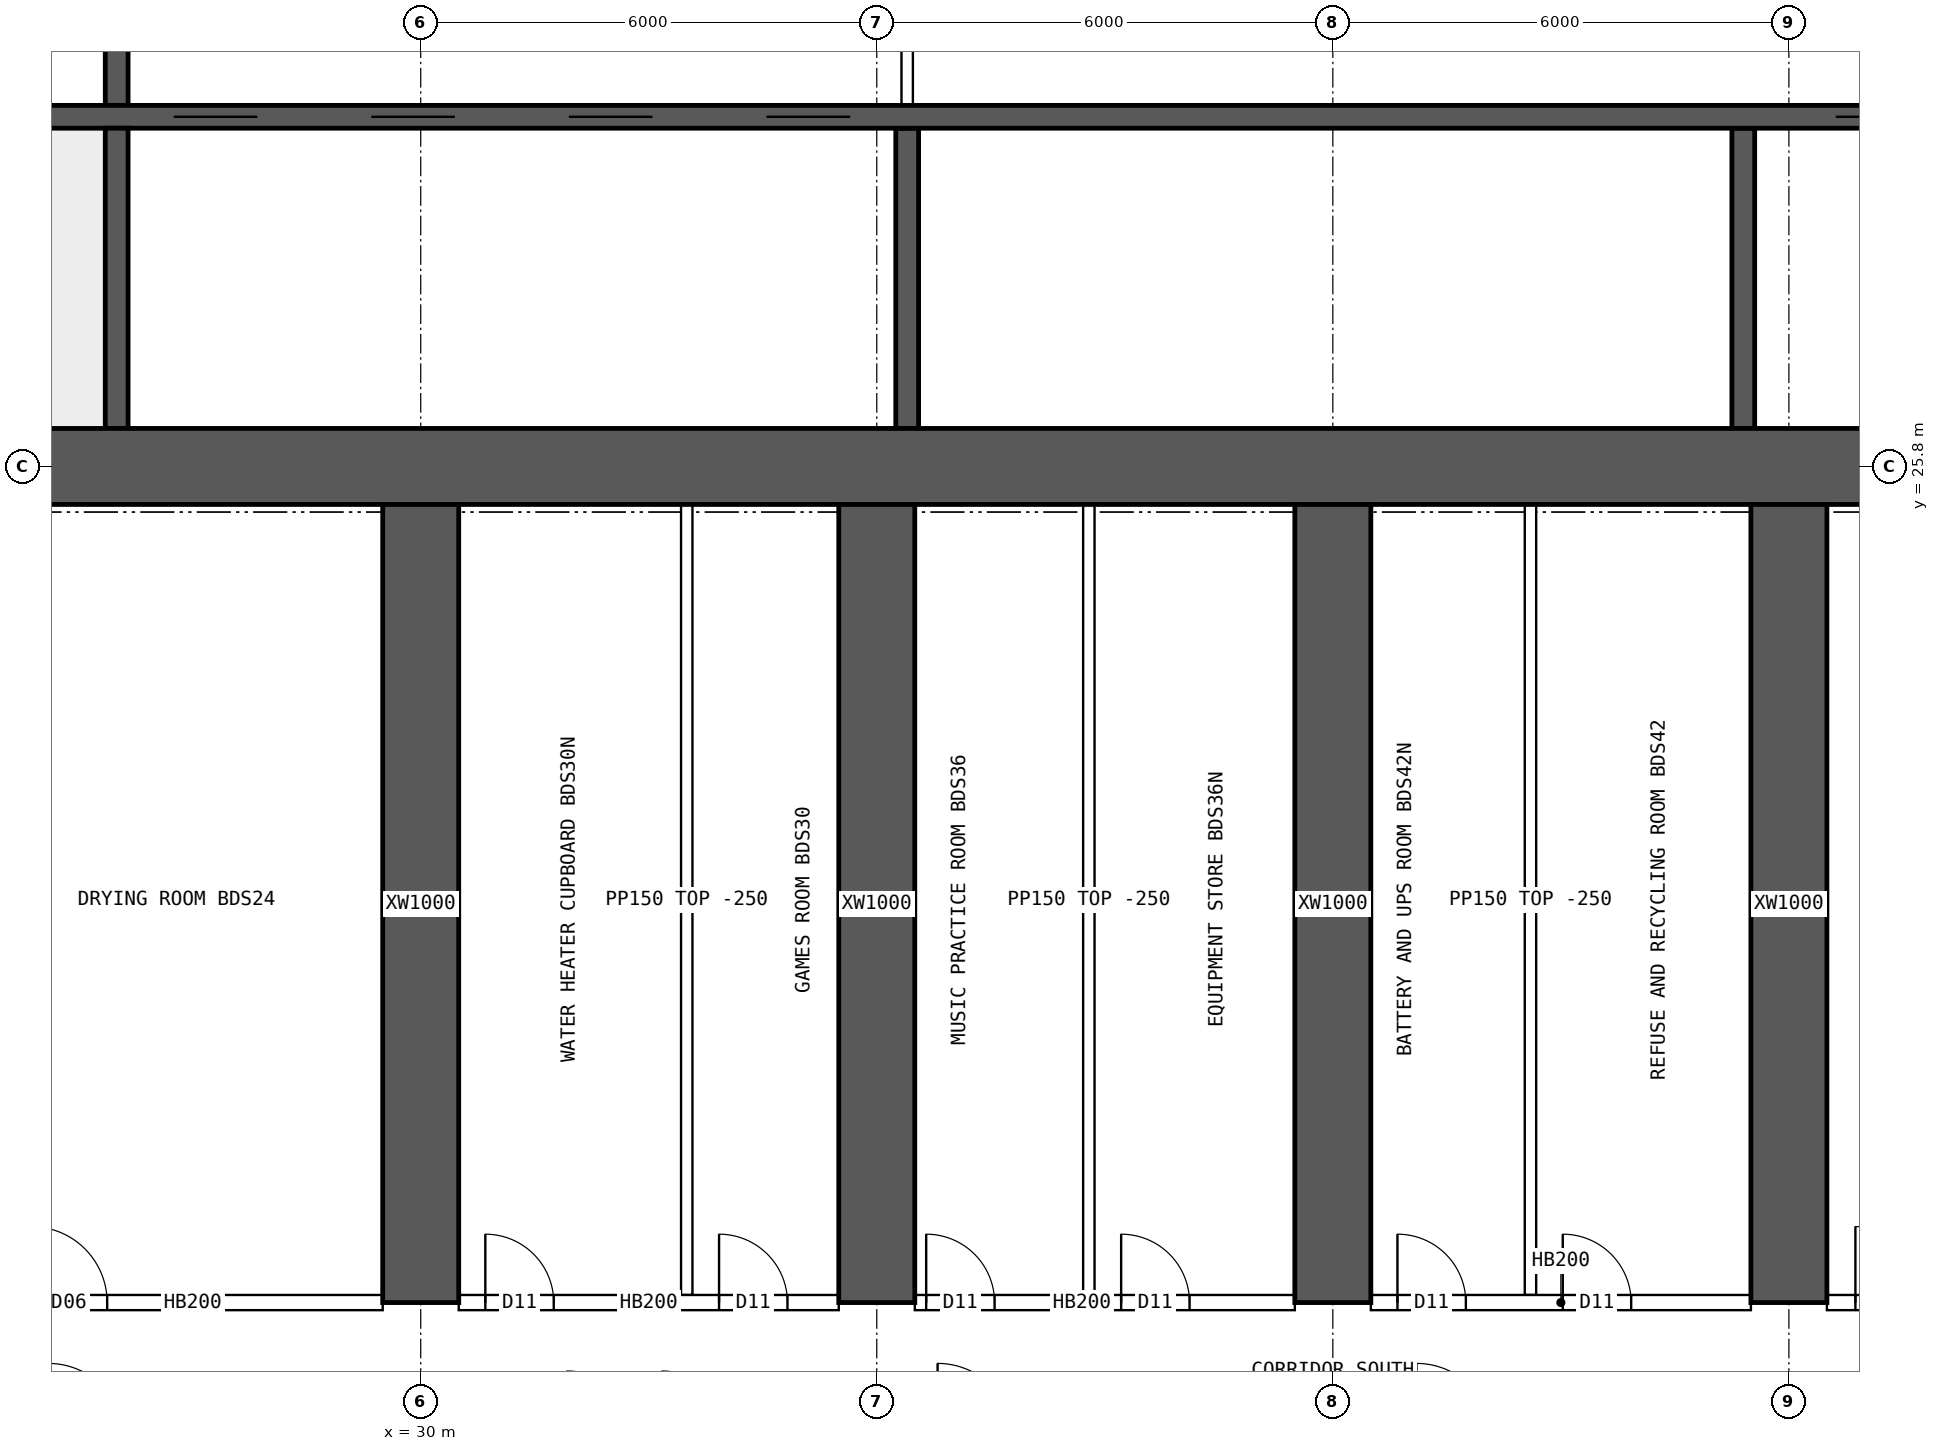
"""IFC4 building model, lengths in metres.
Left out: names, types, materials, properties, quantities, classifications, styles, units other than length and angle.
Written with IfcOpenShell. Run it as: python <this file> out.ifc"""

import sys

from ifc_helpers import new_model, si_unit, direction, frame, frame_2d, origin, place, context, subcontext, project, spatial, rectangle, extrude, element, fill, save


model = new_model("IFC4")
c1 = context("Model", 3, precision=1e-05, world=origin(), true_north=direction((0.0, 1.0)))
c2 = subcontext(c1, "Body", "Model", "MODEL_VIEW")
j1 = project(units=[si_unit("LENGTHUNIT", "METRE"), si_unit("PLANEANGLEUNIT", "RADIAN")], contexts=[c1])
p1 = place(None, origin())
s1 = spatial("IfcSite", under=j1, at=p1, CompositionType="ELEMENT")
p2 = place(p1, origin())
s2 = spatial("IfcBuilding", under=s1, at=p2, CompositionType="ELEMENT")
p3 = place(p2, frame((0.0, 0.0, 23.95)))
s3 = spatial("IfcBuildingStorey", under=s2, at=p3, CompositionType="ELEMENT", Elevation=23.95)
p4 = place(p3, frame((18.0, 25.8, 0.0), z_axis=(0.0, 0.0, 1.0), x_axis=(1.0, 0.0, 0.0)))
e1 = element("IfcWall", 1, at=p4, inside=s3, PredefinedType="SHEAR", context=c2, shape_type="SweptSolid", body=[
    extrude(rectangle(XDim=48.0, YDim=1.0, at=frame_2d((24.0, 0.0))), origin(), (0.0, 0.0, 1.0), 3.75),
])
p5 = place(p3, frame((18.5, 30.4, 0.0), z_axis=(0.0, 0.0, 1.0), x_axis=(1.0, 0.0, 0.0)))
e2 = element("IfcWall", 2, at=p5, inside=s3, PredefinedType="SHEAR", context=c2, shape_type="SweptSolid", body=[
    extrude(rectangle(XDim=47.0, YDim=0.3, at=frame_2d((23.5, 0.0))), origin(), (0.0, 0.0, 1.0), 3.75),
])
p6 = place(p5, frame((0.4, 0.0, 0.0)))
e3 = element("IfcOpeningElement", 3, at=p6, cuts=e2, PredefinedType="OPENING", context=c2, shape_type="SweptSolid", body=[
    extrude(rectangle(XDim=1.0, YDim=2.1, at=frame_2d((0.5, 1.05))), frame((0.0, 0.16, 0.0), z_axis=(0.0, -1.0, 0.0), x_axis=(1.0, 0.0, 0.0)), (0.0, 0.0, 1.0), 0.32),
])
p7 = place(p5, frame((45.6, 0.0, 0.0)))
e4 = element("IfcOpeningElement", 4, at=p7, cuts=e2, PredefinedType="OPENING", context=c2, shape_type="SweptSolid", body=[
    extrude(rectangle(XDim=1.0, YDim=2.1, at=frame_2d((0.5, 1.05))), frame((0.0, 0.16, 0.0), z_axis=(0.0, -1.0, 0.0), x_axis=(1.0, 0.0, 0.0)), (0.0, 0.0, 1.0), 0.32),
])
p8 = place(p5, frame((8.25, 0.0, 0.0)))
e5 = element("IfcOpeningElement", 5, at=p8, cuts=e2, PredefinedType="OPENING", context=c2, shape_type="SweptSolid", body=[
    extrude(rectangle(XDim=1.1, YDim=2.1, at=frame_2d((0.55, 1.05))), frame((0.0, 0.16, 0.0), z_axis=(0.0, -1.0, 0.0), x_axis=(1.0, 0.0, 0.0)), (0.0, 0.0, 1.0), 0.32),
])
p9 = place(p5, frame((10.85, 0.0, 0.0)))
e6 = element("IfcOpeningElement", 6, at=p9, cuts=e2, PredefinedType="OPENING", context=c2, shape_type="SweptSolid", body=[
    extrude(rectangle(XDim=1.1, YDim=2.1, at=frame_2d((0.55, 1.05))), frame((0.0, 0.16, 0.0), z_axis=(0.0, -1.0, 0.0), x_axis=(1.0, 0.0, 0.0)), (0.0, 0.0, 1.0), 0.32),
])
p10 = place(p5, frame((13.45, 0.0, 0.0)))
e7 = element("IfcOpeningElement", 7, at=p10, cuts=e2, PredefinedType="OPENING", context=c2, shape_type="SweptSolid", body=[
    extrude(rectangle(XDim=1.1, YDim=2.1, at=frame_2d((0.55, 1.05))), frame((0.0, 0.16, 0.0), z_axis=(0.0, -1.0, 0.0), x_axis=(1.0, 0.0, 0.0)), (0.0, 0.0, 1.0), 0.32),
])
p11 = place(p5, frame((16.05, 0.0, 0.0)))
e8 = element("IfcOpeningElement", 8, at=p11, cuts=e2, PredefinedType="OPENING", context=c2, shape_type="SweptSolid", body=[
    extrude(rectangle(XDim=1.1, YDim=2.1, at=frame_2d((0.55, 1.05))), frame((0.0, 0.16, 0.0), z_axis=(0.0, -1.0, 0.0), x_axis=(1.0, 0.0, 0.0)), (0.0, 0.0, 1.0), 0.32),
])
p12 = place(p5, frame((30.117, 0.0, 0.0)))
e9 = element("IfcOpeningElement", 9, at=p12, cuts=e2, PredefinedType="OPENING", context=c2, shape_type="SweptSolid", body=[
    extrude(rectangle(XDim=1.1, YDim=2.1, at=frame_2d((0.55, 1.05))), frame((0.0, 0.16, 0.0), z_axis=(0.0, -1.0, 0.0), x_axis=(1.0, 0.0, 0.0)), (0.0, 0.0, 1.0), 0.32),
])
p13 = place(p5, frame((33.65, 0.0, 0.0)))
e10 = element("IfcOpeningElement", 10, at=p13, cuts=e2, PredefinedType="OPENING", context=c2, shape_type="SweptSolid", body=[
    extrude(rectangle(XDim=1.1, YDim=2.1, at=frame_2d((0.55, 1.05))), frame((0.0, 0.16, 0.0), z_axis=(0.0, -1.0, 0.0), x_axis=(1.0, 0.0, 0.0)), (0.0, 0.0, 1.0), 0.32),
])
p14 = place(p5, frame((37.183, 0.0, 0.0)))
e11 = element("IfcOpeningElement", 11, at=p14, cuts=e2, PredefinedType="OPENING", context=c2, shape_type="SweptSolid", body=[
    extrude(rectangle(XDim=1.1, YDim=2.1, at=frame_2d((0.55, 1.05))), frame((0.0, 0.16, 0.0), z_axis=(0.0, -1.0, 0.0), x_axis=(1.0, 0.0, 0.0)), (0.0, 0.0, 1.0), 0.32),
])
p15 = place(p3, frame((26.0, 26.3, 0.0), z_axis=(0.0, 0.0, 1.0), x_axis=(0.0, 1.0, 0.0)))
e12 = element("IfcWall", 12, at=p15, inside=s3, PredefinedType="SHEAR", context=c2, shape_type="SweptSolid", body=[
    extrude(rectangle(XDim=3.95, YDim=0.3, at=frame_2d((1.975, 0.0))), origin(), (0.0, 0.0, 1.0), 3.75),
])
p16 = place(p3, frame((26.0, 30.55, 0.0), z_axis=(0.0, 0.0, 1.0), x_axis=(0.0, 1.0, 0.0)))
e13 = element("IfcWall", 13, at=p16, inside=s3, PredefinedType="SHEAR", context=c2, shape_type="SweptSolid", body=[
    extrude(rectangle(XDim=3.9, YDim=0.3, at=frame_2d((1.95, 0.0))), origin(), (0.0, 0.0, 1.0), 3.75),
])
p17 = place(p16, frame((1.4, 0.0, 0.0)))
e14 = element("IfcOpeningElement", 14, at=p17, cuts=e13, PredefinedType="OPENING", context=c2, shape_type="SweptSolid", body=[
    extrude(rectangle(XDim=1.2, YDim=2.1, at=frame_2d((0.6, 1.05))), frame((0.0, 0.16, 0.0), z_axis=(0.0, -1.0, 0.0), x_axis=(1.0, 0.0, 0.0)), (0.0, 0.0, 1.0), 0.32),
])
for number, where, z_axis, x_axis in (
    (15, (36.4, 26.3, 0.0), (0.0, 0.0, 1.0), (0.0, 1.0, 0.0)),
    (16, (47.4, 26.3, 0.0), (0.0, 0.0, 1.0), (0.0, 1.0, 0.0)),
):
    element("IfcWall", number, at=place(p3, frame(where, z_axis=z_axis, x_axis=x_axis)), inside=s3, PredefinedType="SHEAR", context=c2, shape_type="SweptSolid", body=[
        extrude(rectangle(XDim=3.95, YDim=0.3, at=frame_2d((1.975, 0.0))), origin(), (0.0, 0.0, 1.0), 3.75),
    ])
for number, where, z_axis, x_axis in (
    (17, (30.0, 14.8, 0.0), (0.0, 0.0, 1.0), (0.0, 1.0, 0.0)),
    (18, (36.0, 14.8, 0.0), (0.0, 0.0, 1.0), (0.0, 1.0, 0.0)),
    (19, (42.0, 14.8, 0.0), (0.0, 0.0, 1.0), (0.0, 1.0, 0.0)),
    (20, (48.0, 14.8, 0.0), (0.0, 0.0, 1.0), (0.0, 1.0, 0.0)),
):
    element("IfcWall", number, at=place(p3, frame(where, z_axis=z_axis, x_axis=x_axis)), inside=s3, PredefinedType="SHEAR", context=c2, shape_type="SweptSolid", body=[
        extrude(rectangle(XDim=10.5, YDim=1.0, at=frame_2d((5.25, 0.0))), origin(), (0.0, 0.0, 1.0), 3.75),
    ])
p18 = place(p3, frame((36.4, 30.55, 0.0), z_axis=(0.0, 0.0, 1.0), x_axis=(0.0, 1.0, 0.0)))
e21 = element("IfcWall", 21, at=p18, inside=s3, PredefinedType="SOLIDWALL", context=c2, shape_type="SweptSolid", body=[
    extrude(rectangle(XDim=3.9, YDim=0.15, at=frame_2d((1.95, 0.0))), origin(), (0.0, 0.0, 1.0), 3.5),
])
p19 = place(p18, frame((1.15, 0.0, 0.0)))
e22 = element("IfcOpeningElement", 22, at=p19, cuts=e21, PredefinedType="OPENING", context=c2, shape_type="SweptSolid", body=[
    extrude(rectangle(XDim=1.6, YDim=2.1, at=frame_2d((0.8, 1.05))), frame((0.0, 0.085, 0.0), z_axis=(0.0, -1.0, 0.0), x_axis=(1.0, 0.0, 0.0)), (0.0, 0.0, 1.0), 0.17),
])
p20 = place(p3, frame((24.5, 14.8, 0.0), z_axis=(0.0, 0.0, 1.0), x_axis=(1.0, 0.0, 0.0)))
e23 = element("IfcWall", 23, at=p20, inside=s3, PredefinedType="SOLIDWALL", context=c2, shape_type="SweptSolid", body=[
    extrude(rectangle(XDim=5.0, YDim=0.2, at=frame_2d((2.5, 0.0))), origin(), (0.0, 0.0, 1.0), 3.5),
])
p21 = place(p20, frame((0.375, 0.0, 0.0)))
e24 = element("IfcOpeningElement", 24, at=p21, cuts=e23, PredefinedType="OPENING", context=c2, shape_type="SweptSolid", body=[
    extrude(rectangle(XDim=1.0, YDim=2.1, at=frame_2d((0.5, 1.05))), frame((0.0, 0.11, 0.0), z_axis=(0.0, -1.0, 0.0), x_axis=(1.0, 0.0, 0.0)), (0.0, 0.0, 1.0), 0.22),
])
p22 = place(p3, frame((30.5, 14.8, 0.0), z_axis=(0.0, 0.0, 1.0), x_axis=(1.0, 0.0, 0.0)))
e25 = element("IfcWall", 25, at=p22, inside=s3, PredefinedType="SOLIDWALL", context=c2, shape_type="SweptSolid", body=[
    extrude(rectangle(XDim=5.0, YDim=0.2, at=frame_2d((2.5, 0.0))), origin(), (0.0, 0.0, 1.0), 3.5),
])
p23 = place(p22, frame((0.35, 0.0, 0.0)))
e26 = element("IfcOpeningElement", 26, at=p23, cuts=e25, PredefinedType="OPENING", context=c2, shape_type="SweptSolid", body=[
    extrude(rectangle(XDim=0.9, YDim=2.1, at=frame_2d((0.45, 1.05))), frame((0.0, 0.11, 0.0), z_axis=(0.0, -1.0, 0.0), x_axis=(1.0, 0.0, 0.0)), (0.0, 0.0, 1.0), 0.22),
])
p24 = place(p22, frame((3.425, 0.0, 0.0)))
e27 = element("IfcOpeningElement", 27, at=p24, cuts=e25, PredefinedType="OPENING", context=c2, shape_type="SweptSolid", body=[
    extrude(rectangle(XDim=0.9, YDim=2.1, at=frame_2d((0.45, 1.05))), frame((0.0, 0.11, 0.0), z_axis=(0.0, -1.0, 0.0), x_axis=(1.0, 0.0, 0.0)), (0.0, 0.0, 1.0), 0.22),
])
p25 = place(p3, frame((36.5, 14.8, 0.0), z_axis=(0.0, 0.0, 1.0), x_axis=(1.0, 0.0, 0.0)))
e28 = element("IfcWall", 28, at=p25, inside=s3, PredefinedType="SOLIDWALL", context=c2, shape_type="SweptSolid", body=[
    extrude(rectangle(XDim=5.0, YDim=0.2, at=frame_2d((2.5, 0.0))), origin(), (0.0, 0.0, 1.0), 3.5),
])
p26 = place(p25, frame((0.15, 0.0, 0.0)))
e29 = element("IfcOpeningElement", 29, at=p26, cuts=e28, PredefinedType="OPENING", context=c2, shape_type="SweptSolid", body=[
    extrude(rectangle(XDim=0.9, YDim=2.1, at=frame_2d((0.45, 1.05))), frame((0.0, 0.11, 0.0), z_axis=(0.0, -1.0, 0.0), x_axis=(1.0, 0.0, 0.0)), (0.0, 0.0, 1.0), 0.22),
])
p27 = place(p25, frame((2.715, 0.0, 0.0)))
e30 = element("IfcOpeningElement", 30, at=p27, cuts=e28, PredefinedType="OPENING", context=c2, shape_type="SweptSolid", body=[
    extrude(rectangle(XDim=0.9, YDim=2.1, at=frame_2d((0.45, 1.05))), frame((0.0, 0.11, 0.0), z_axis=(0.0, -1.0, 0.0), x_axis=(1.0, 0.0, 0.0)), (0.0, 0.0, 1.0), 0.22),
])
p28 = place(p3, frame((42.5, 14.8, 0.0), z_axis=(0.0, 0.0, 1.0), x_axis=(1.0, 0.0, 0.0)))
e31 = element("IfcWall", 31, at=p28, inside=s3, PredefinedType="SOLIDWALL", context=c2, shape_type="SweptSolid", body=[
    extrude(rectangle(XDim=5.0, YDim=0.2, at=frame_2d((2.5, 0.0))), origin(), (0.0, 0.0, 1.0), 3.5),
])
p29 = place(p28, frame((0.35, 0.0, 0.0)))
e32 = element("IfcOpeningElement", 32, at=p29, cuts=e31, PredefinedType="OPENING", context=c2, shape_type="SweptSolid", body=[
    extrude(rectangle(XDim=0.9, YDim=2.1, at=frame_2d((0.45, 1.05))), frame((0.0, 0.11, 0.0), z_axis=(0.0, -1.0, 0.0), x_axis=(1.0, 0.0, 0.0)), (0.0, 0.0, 1.0), 0.22),
])
p30 = place(p28, frame((2.525, 0.0, 0.0)))
e33 = element("IfcOpeningElement", 33, at=p30, cuts=e31, PredefinedType="OPENING", context=c2, shape_type="SweptSolid", body=[
    extrude(rectangle(XDim=0.9, YDim=2.1, at=frame_2d((0.45, 1.05))), frame((0.0, 0.11, 0.0), z_axis=(0.0, -1.0, 0.0), x_axis=(1.0, 0.0, 0.0)), (0.0, 0.0, 1.0), 0.22),
])
p31 = place(p3, frame((48.5, 14.8, 0.0), z_axis=(0.0, 0.0, 1.0), x_axis=(1.0, 0.0, 0.0)))
e34 = element("IfcWall", 34, at=p31, inside=s3, PredefinedType="SOLIDWALL", context=c2, shape_type="SweptSolid", body=[
    extrude(rectangle(XDim=5.0, YDim=0.2, at=frame_2d((2.5, 0.0))), origin(), (0.0, 0.0, 1.0), 3.5),
])
p32 = place(p31, frame((0.375, 0.0, 0.0)))
e35 = element("IfcOpeningElement", 35, at=p32, cuts=e34, PredefinedType="OPENING", context=c2, shape_type="SweptSolid", body=[
    extrude(rectangle(XDim=1.0, YDim=2.1, at=frame_2d((0.5, 1.05))), frame((0.0, 0.11, 0.0), z_axis=(0.0, -1.0, 0.0), x_axis=(1.0, 0.0, 0.0)), (0.0, 0.0, 1.0), 0.22),
])
for number, where, z_axis, x_axis in (
    (36, (33.5, 14.9, 0.0), (0.0, 0.0, 1.0), (0.0, 1.0, 0.0)),
    (37, (38.79, 14.9, 0.0), (0.0, 0.0, 1.0), (0.0, 1.0, 0.0)),
    (38, (44.6, 14.9, 0.0), (0.0, 0.0, 1.0), (0.0, 1.0, 0.0)),
):
    element("IfcWall", number, at=place(p3, frame(where, z_axis=z_axis, x_axis=x_axis)), inside=s3, PredefinedType="PARTITIONING", context=c2, shape_type="SweptSolid", body=[
        extrude(rectangle(XDim=10.4, YDim=0.15, at=frame_2d((5.2, 0.0))), origin(), (0.0, 0.0, 1.0), 3.5),
    ])
p33 = place(p8, origin())
e39 = element("IfcDoor", 39, at=p33, inside=s3, OperationType="DOUBLE_DOOR_SLIDING", PredefinedType="DOOR", context=c2, shape_type="SweptSolid", body=[
    extrude(rectangle(XDim=1.1, YDim=2.1, at=frame_2d((0.55, 1.05))), frame((0.0, 0.025, 0.0), z_axis=(0.0, -1.0, 0.0), x_axis=(1.0, 0.0, 0.0)), (0.0, 0.0, 1.0), 0.05),
])
fill(e5, e39)
p34 = place(p9, origin())
e40 = element("IfcDoor", 40, at=p34, inside=s3, OperationType="DOUBLE_DOOR_SLIDING", PredefinedType="DOOR", context=c2, shape_type="SweptSolid", body=[
    extrude(rectangle(XDim=1.1, YDim=2.1, at=frame_2d((0.55, 1.05))), frame((0.0, 0.025, 0.0), z_axis=(0.0, -1.0, 0.0), x_axis=(1.0, 0.0, 0.0)), (0.0, 0.0, 1.0), 0.05),
])
fill(e6, e40)
p35 = place(p10, origin())
e41 = element("IfcDoor", 41, at=p35, inside=s3, OperationType="DOUBLE_DOOR_SLIDING", PredefinedType="DOOR", context=c2, shape_type="SweptSolid", body=[
    extrude(rectangle(XDim=1.1, YDim=2.1, at=frame_2d((0.55, 1.05))), frame((0.0, 0.025, 0.0), z_axis=(0.0, -1.0, 0.0), x_axis=(1.0, 0.0, 0.0)), (0.0, 0.0, 1.0), 0.05),
])
fill(e7, e41)
p36 = place(p11, origin())
e42 = element("IfcDoor", 42, at=p36, inside=s3, OperationType="DOUBLE_DOOR_SLIDING", PredefinedType="DOOR", context=c2, shape_type="SweptSolid", body=[
    extrude(rectangle(XDim=1.1, YDim=2.1, at=frame_2d((0.55, 1.05))), frame((0.0, 0.025, 0.0), z_axis=(0.0, -1.0, 0.0), x_axis=(1.0, 0.0, 0.0)), (0.0, 0.0, 1.0), 0.05),
])
fill(e8, e42)
p37 = place(p12, origin())
e43 = element("IfcDoor", 43, at=p37, inside=s3, OperationType="DOUBLE_DOOR_SLIDING", PredefinedType="DOOR", context=c2, shape_type="SweptSolid", body=[
    extrude(rectangle(XDim=1.1, YDim=2.1, at=frame_2d((0.55, 1.05))), frame((0.0, 0.025, 0.0), z_axis=(0.0, -1.0, 0.0), x_axis=(1.0, 0.0, 0.0)), (0.0, 0.0, 1.0), 0.05),
])
fill(e9, e43)
p38 = place(p21, origin())
e44 = element("IfcDoor", 44, at=p38, inside=s3, OperationType="SINGLE_SWING_LEFT", PredefinedType="DOOR", context=c2, shape_type="SweptSolid", body=[
    extrude(rectangle(XDim=1.0, YDim=2.1, at=frame_2d((0.5, 1.05))), frame((0.0, 0.025, 0.0), z_axis=(0.0, -1.0, 0.0), x_axis=(1.0, 0.0, 0.0)), (0.0, 0.0, 1.0), 0.05),
])
fill(e24, e44)
p39 = place(p23, origin())
e45 = element("IfcDoor", 45, at=p39, inside=s3, OperationType="SINGLE_SWING_LEFT", PredefinedType="DOOR", context=c2, shape_type="SweptSolid", body=[
    extrude(rectangle(XDim=0.9, YDim=2.1, at=frame_2d((0.45, 1.05))), frame((0.0, 0.025, 0.0), z_axis=(0.0, -1.0, 0.0), x_axis=(1.0, 0.0, 0.0)), (0.0, 0.0, 1.0), 0.05),
])
fill(e26, e45)
p40 = place(p24, origin())
e46 = element("IfcDoor", 46, at=p40, inside=s3, OperationType="SINGLE_SWING_LEFT", PredefinedType="DOOR", context=c2, shape_type="SweptSolid", body=[
    extrude(rectangle(XDim=0.9, YDim=2.1, at=frame_2d((0.45, 1.05))), frame((0.0, 0.025, 0.0), z_axis=(0.0, -1.0, 0.0), x_axis=(1.0, 0.0, 0.0)), (0.0, 0.0, 1.0), 0.05),
])
fill(e27, e46)
p41 = place(p26, origin())
e47 = element("IfcDoor", 47, at=p41, inside=s3, OperationType="SINGLE_SWING_LEFT", PredefinedType="DOOR", context=c2, shape_type="SweptSolid", body=[
    extrude(rectangle(XDim=0.9, YDim=2.1, at=frame_2d((0.45, 1.05))), frame((0.0, 0.025, 0.0), z_axis=(0.0, -1.0, 0.0), x_axis=(1.0, 0.0, 0.0)), (0.0, 0.0, 1.0), 0.05),
])
fill(e29, e47)
p42 = place(p27, origin())
e48 = element("IfcDoor", 48, at=p42, inside=s3, OperationType="SINGLE_SWING_LEFT", PredefinedType="DOOR", context=c2, shape_type="SweptSolid", body=[
    extrude(rectangle(XDim=0.9, YDim=2.1, at=frame_2d((0.45, 1.05))), frame((0.0, 0.025, 0.0), z_axis=(0.0, -1.0, 0.0), x_axis=(1.0, 0.0, 0.0)), (0.0, 0.0, 1.0), 0.05),
])
fill(e30, e48)
p43 = place(p29, origin())
e49 = element("IfcDoor", 49, at=p43, inside=s3, OperationType="SINGLE_SWING_LEFT", PredefinedType="DOOR", context=c2, shape_type="SweptSolid", body=[
    extrude(rectangle(XDim=0.9, YDim=2.1, at=frame_2d((0.45, 1.05))), frame((0.0, 0.025, 0.0), z_axis=(0.0, -1.0, 0.0), x_axis=(1.0, 0.0, 0.0)), (0.0, 0.0, 1.0), 0.05),
])
fill(e32, e49)
p44 = place(p30, origin())
e50 = element("IfcDoor", 50, at=p44, inside=s3, OperationType="SINGLE_SWING_LEFT", PredefinedType="DOOR", context=c2, shape_type="SweptSolid", body=[
    extrude(rectangle(XDim=0.9, YDim=2.1, at=frame_2d((0.45, 1.05))), frame((0.0, 0.025, 0.0), z_axis=(0.0, -1.0, 0.0), x_axis=(1.0, 0.0, 0.0)), (0.0, 0.0, 1.0), 0.05),
])
fill(e33, e50)
p45 = place(p32, origin())
e51 = element("IfcDoor", 51, at=p45, inside=s3, OperationType="SINGLE_SWING_LEFT", PredefinedType="DOOR", context=c2, shape_type="SweptSolid", body=[
    extrude(rectangle(XDim=1.0, YDim=2.1, at=frame_2d((0.5, 1.05))), frame((0.0, 0.025, 0.0), z_axis=(0.0, -1.0, 0.0), x_axis=(1.0, 0.0, 0.0)), (0.0, 0.0, 1.0), 0.05),
])
fill(e35, e51)
save(model, sys.argv[1])
